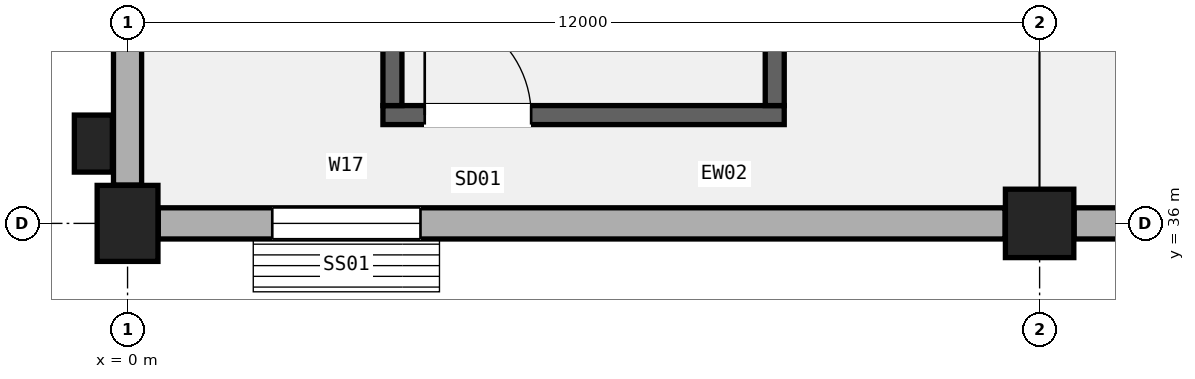
"""IFC4 building model, lengths in metres.
Left out: names, types, materials, properties, quantities, classifications, styles, units other than length and angle.
Written with IfcOpenShell. Run it as: python <this file> out.ifc"""

import sys

from ifc_helpers import new_model, si_unit, direction, frame, frame_2d, origin, origin_2d, place, context, subcontext, project, spatial, rectangle, extrude, element, fill, save


model = new_model("IFC4")
c1 = context("Model", 3, precision=1e-05, world=origin(), true_north=direction((0.0, 1.0)))
c2 = subcontext(c1, "Body", "Model", "MODEL_VIEW")
j1 = project(units=[si_unit("LENGTHUNIT", "METRE"), si_unit("PLANEANGLEUNIT", "RADIAN")], contexts=[c1])
p1 = place(None, origin())
s1 = spatial("IfcSite", under=j1, at=p1, CompositionType="ELEMENT")
p2 = place(p1, origin())
s2 = spatial("IfcBuilding", under=s1, at=p2, CompositionType="ELEMENT")
p3 = place(p2, frame((0.0, 0.0, 5.4)))
s3 = spatial("IfcBuildingStorey", under=s2, at=p3, CompositionType="ELEMENT", Elevation=5.4)
p4 = place(p3, frame((0.0, 36.0, 0.0), z_axis=(0.0, 0.0, 1.0), x_axis=(1.0, 0.0, 0.0)))
e1 = element("IfcColumn", 1, at=p4, inside=s3, PredefinedType="COLUMN", context=c2, shape_type="SweptSolid", body=[
    extrude(rectangle(XDim=0.8, YDim=1.0, at=origin_2d()), origin(), (0.0, 0.0, 1.0), 4.8),
])
p5 = place(p3, frame((12.0, 36.0, 0.0), z_axis=(0.0, 0.0, 1.0), x_axis=(1.0, 0.0, 0.0)))
e2 = element("IfcColumn", 2, at=p5, inside=s3, PredefinedType="COLUMN", context=c2, shape_type="SweptSolid", body=[
    extrude(rectangle(XDim=0.9, YDim=0.9, at=origin_2d()), origin(), (0.0, 0.0, 1.0), 4.8),
])
p6 = place(p3, frame((-0.45, 37.05, 0.0), z_axis=(0.0, 0.0, 1.0), x_axis=(1.0, 0.0, 0.0)))
e3 = element("IfcColumn", 3, at=p6, inside=s3, PredefinedType="PILASTER", context=c2, shape_type="SweptSolid", body=[
    extrude(rectangle(XDim=0.5, YDim=0.75, at=origin_2d()), origin(), (0.0, 0.0, 1.0), 4.8),
])
p7 = place(p3, frame((0.404, 36.0, 0.0), z_axis=(0.0, 0.0, 1.0), x_axis=(1.0, 0.0, 0.0)))
e4 = element("IfcWall", 4, at=p7, inside=s3, PredefinedType="SOLIDWALL", context=c2, shape_type="SweptSolid", body=[
    extrude(rectangle(XDim=11.142, YDim=0.41, at=frame_2d((5.571, 0.0))), origin(), (0.0, 0.0, 1.0), 4.2),
])
p8 = place(p7, frame((1.5, 0.0, 0.95)))
e5 = element("IfcOpeningElement", 5, at=p8, cuts=e4, PredefinedType="OPENING", context=c2, shape_type="SweptSolid", body=[
    extrude(rectangle(XDim=1.95, YDim=2.35, at=frame_2d((0.975, 1.175))), frame((0.0, 0.215, 0.0), z_axis=(0.0, -1.0, 0.0), x_axis=(1.0, 0.0, 0.0)), (0.0, 0.0, 1.0), 0.43),
])
p9 = place(p3, frame((0.0, 36.504, 0.0), z_axis=(0.0, 0.0, 1.0), x_axis=(0.0, 1.0, 0.0)))
e6 = element("IfcWall", 6, at=p9, inside=s3, PredefinedType="SOLIDWALL", context=c2, shape_type="SweptSolid", body=[
    extrude(rectangle(XDim=11.042, YDim=0.37, at=frame_2d((5.521, 0.0))), origin(), (0.0, 0.0, 1.0), 4.2),
])
p10 = place(p9, frame((2.75, 0.0, 0.95)))
e7 = element("IfcOpeningElement", 7, at=p10, cuts=e6, PredefinedType="OPENING", context=c2, shape_type="SweptSolid", body=[
    extrude(rectangle(XDim=2.1, YDim=1.85, at=frame_2d((1.05, 0.925))), frame((0.0, 0.195, 0.0), z_axis=(0.0, -1.0, 0.0), x_axis=(1.0, 0.0, 0.0)), (0.0, 0.0, 1.0), 0.39),
])
p11 = place(p3, frame((12.454, 36.0, 0.0), z_axis=(0.0, 0.0, 1.0), x_axis=(1.0, 0.0, 0.0)))
e8 = element("IfcWall", 8, at=p11, inside=s3, PredefinedType="SOLIDWALL", context=c2, shape_type="SweptSolid", body=[
    extrude(rectangle(XDim=0.65, YDim=0.41, at=frame_2d((0.325, 0.0))), origin(), (0.0, 0.0, 1.0), 4.15),
])
p12 = place(p3, frame((3.36, 37.425, 0.0), z_axis=(0.0, 0.0, 1.0), x_axis=(1.0, 0.0, 0.0)))
e9 = element("IfcWall", 9, at=p12, inside=s3, PredefinedType="SHEAR", context=c2, shape_type="SweptSolid", body=[
    extrude(rectangle(XDim=5.28, YDim=0.25, at=frame_2d((2.64, 0.0))), origin(), (0.0, 0.0, 1.0), 4.55),
])
p13 = place(p12, frame((0.55, 0.0, 0.0)))
e10 = element("IfcOpeningElement", 10, at=p13, cuts=e9, PredefinedType="OPENING", context=c2, shape_type="SweptSolid", body=[
    extrude(rectangle(XDim=1.4, YDim=2.15, at=frame_2d((0.7, 1.075))), frame((0.0, 0.135, 0.0), z_axis=(0.0, -1.0, 0.0), x_axis=(1.0, 0.0, 0.0)), (0.0, 0.0, 1.0), 0.27),
])
for number, where, z_axis, x_axis in (
    (11, (3.485, 37.55, 0.0), (0.0, 0.0, 1.0), (0.0, 1.0, 0.0)),
    (12, (8.515, 37.55, 0.0), (0.0, 0.0, 1.0), (0.0, 1.0, 0.0)),
):
    element("IfcWall", number, at=place(p3, frame(where, z_axis=z_axis, x_axis=x_axis)), inside=s3, PredefinedType="SHEAR", context=c2, shape_type="SweptSolid", body=[
        extrude(rectangle(XDim=8.9, YDim=0.25, at=frame_2d((4.45, 0.0))), origin(), (0.0, 0.0, 1.0), 4.55),
    ])
p14 = place(p8, origin())
e13 = element("IfcWindow", 13, at=p14, inside=s3, PartitioningType="SINGLE_PANEL", PredefinedType="WINDOW", context=c2, shape_type="SweptSolid", body=[
    extrude(rectangle(XDim=1.95, YDim=2.35, at=frame_2d((0.975, 1.175))), frame((0.0, 0.03, 0.0), z_axis=(0.0, -1.0, 0.0), x_axis=(1.0, 0.0, 0.0)), (0.0, 0.0, 1.0), 0.06),
])
fill(e5, e13)
p15 = place(p13, origin())
e14 = element("IfcDoor", 14, at=p15, inside=s3, OperationType="SINGLE_SWING_LEFT", PredefinedType="DOOR", context=c2, shape_type="SweptSolid", body=[
    extrude(rectangle(XDim=1.4, YDim=2.15, at=frame_2d((0.7, 1.075))), frame((0.0, 0.025, 0.0), z_axis=(0.0, -1.0, 0.0), x_axis=(1.0, 0.0, 0.0)), (0.0, 0.0, 1.0), 0.05),
])
fill(e10, e14)
save(model, sys.argv[1])
